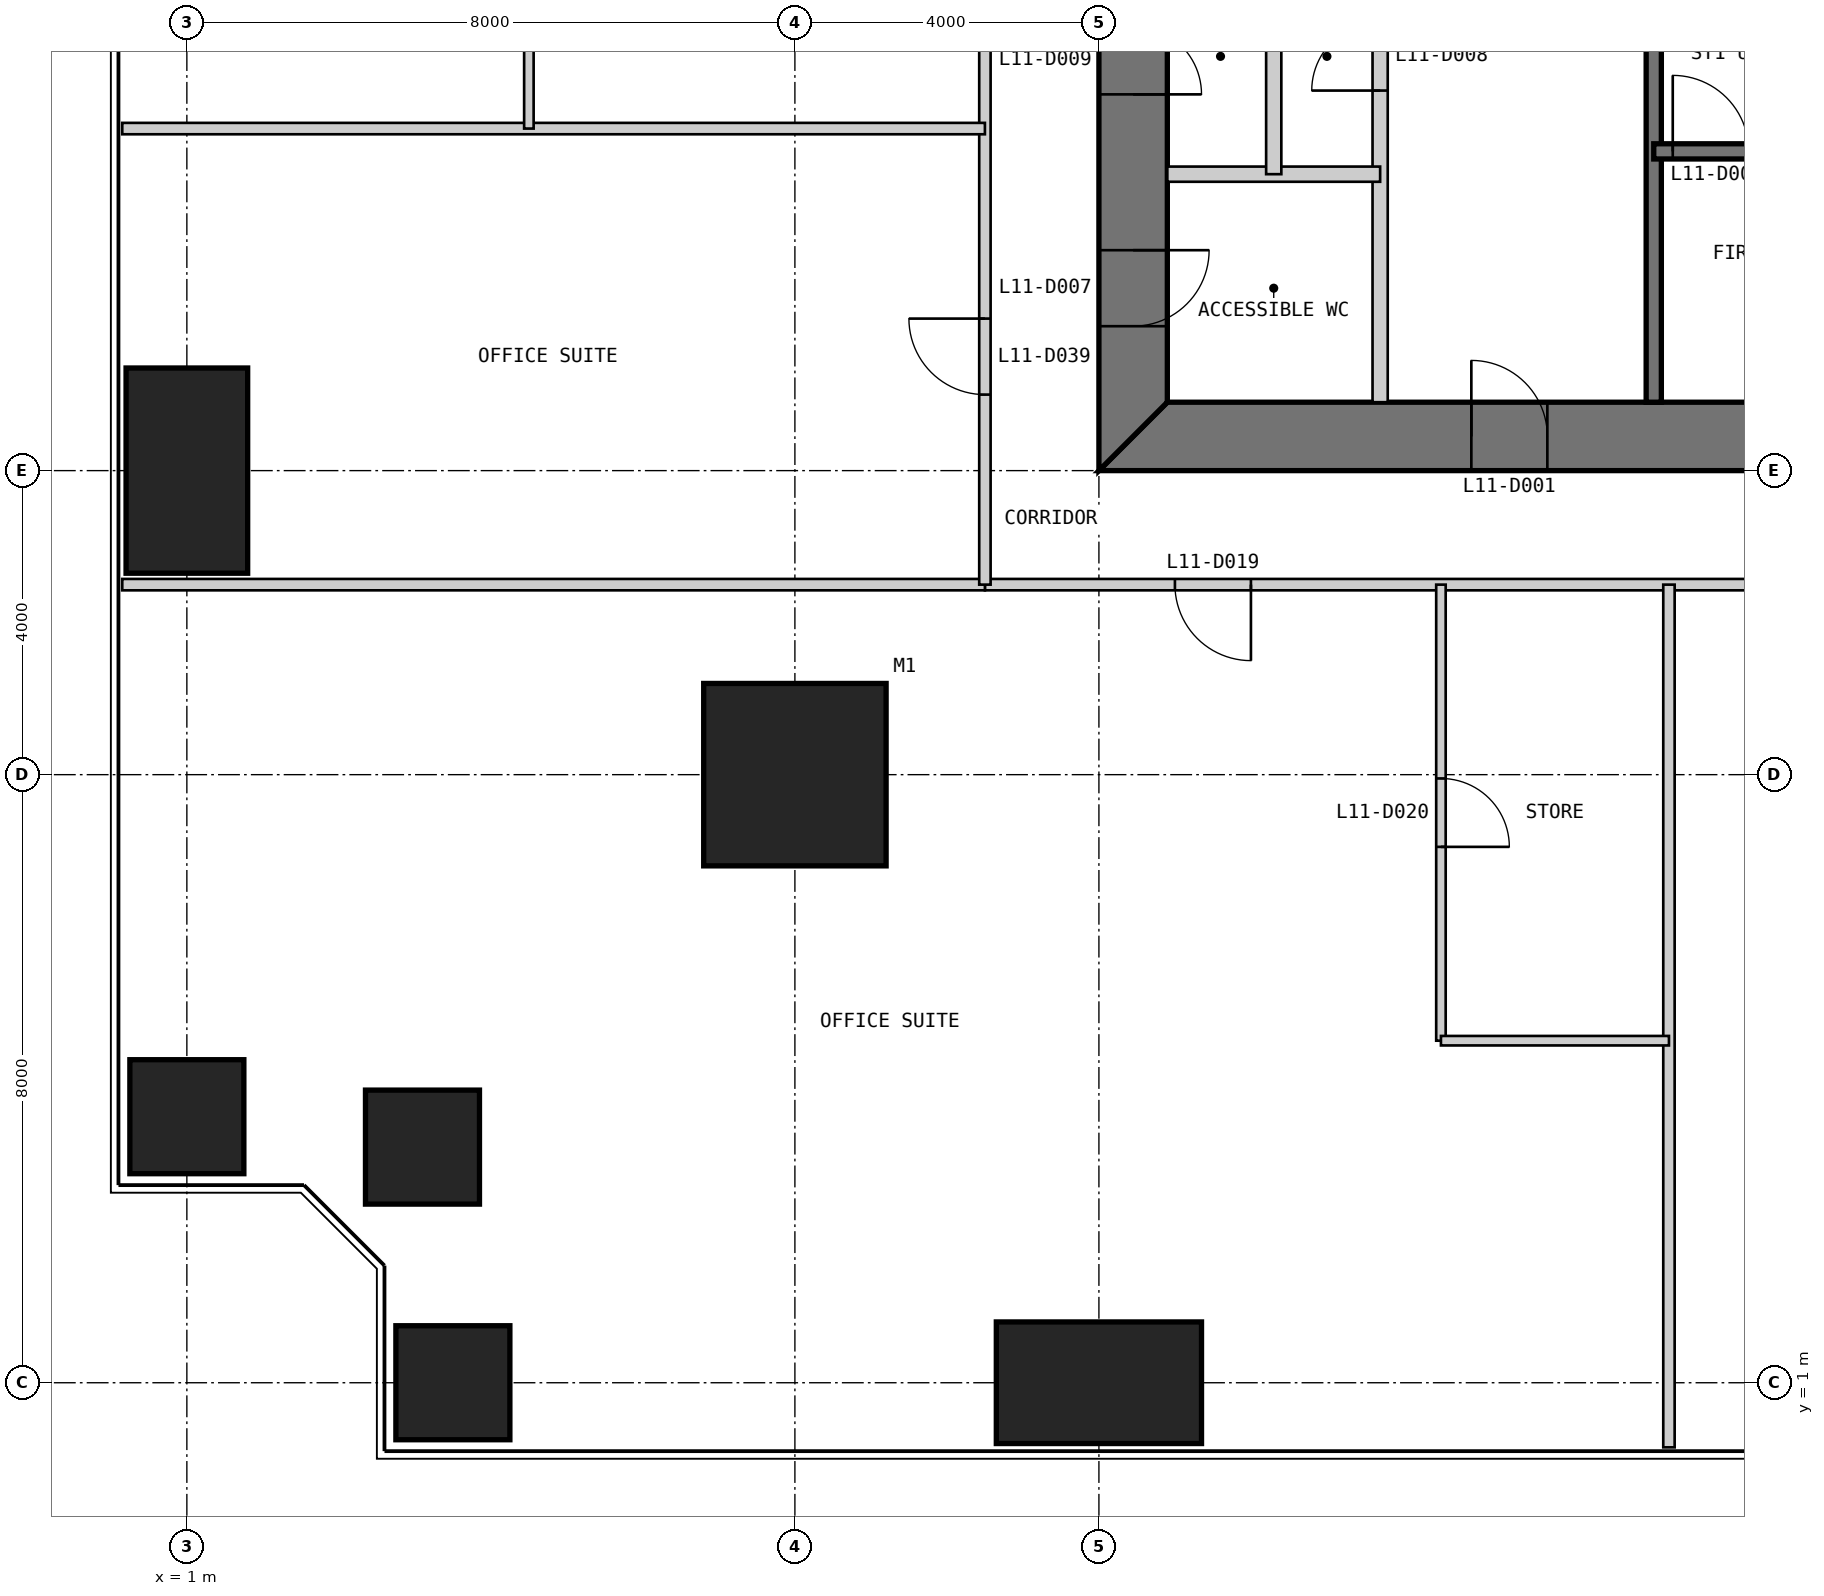
"""IFC4 building model, lengths in metres.
Left out: names, types, materials, properties, quantities, classifications, styles, units other than length and angle.
Written with IfcOpenShell. Run it as: python <this file> out.ifc"""

import sys

from ifc_helpers import new_model, si_unit, direction, frame, frame_2d, origin, origin_2d, place, context, subcontext, project, spatial, polyline, rectangle, outline, extrude, element, fill, save


model = new_model("IFC4")
c1 = context("Model", 3, precision=1e-05, world=origin(), true_north=direction((0.0, 1.0)))
c2 = subcontext(c1, "Body", "Model", "MODEL_VIEW")
j1 = project(units=[si_unit("LENGTHUNIT", "METRE"), si_unit("PLANEANGLEUNIT", "RADIAN")], contexts=[c1])
p1 = place(None, origin())
s1 = spatial("IfcSite", under=j1, at=p1, CompositionType="ELEMENT")
p2 = place(p1, origin())
s2 = spatial("IfcBuilding", under=s1, at=p2, CompositionType="ELEMENT")
p3 = place(p2, frame((0.0, 0.0, 51.0)))
s3 = spatial("IfcBuildingStorey", under=s2, at=p3, CompositionType="ELEMENT", Elevation=51.0)
p4 = place(p3, frame((9.0, 9.0, 0.0), z_axis=(0.0, 0.0, 1.0), x_axis=(1.0, 0.0, 0.0)))
e1 = element("IfcColumn", 1, at=p4, inside=s3, PredefinedType="COLUMN", context=c2, shape_type="SweptSolid", body=[
    extrude(rectangle(XDim=2.4, YDim=2.4, at=origin_2d()), origin(), (0.0, 0.0, 1.0), 4.0),
])
p5 = place(p3, frame((4.5, 1.0, 0.0), z_axis=(0.0, 0.0, 1.0), x_axis=(1.0, 0.0, 0.0)))
e2 = element("IfcColumn", 2, at=p5, inside=s3, PredefinedType="COLUMN", context=c2, shape_type="SweptSolid", body=[
    extrude(rectangle(XDim=1.5, YDim=1.5, at=origin_2d()), origin(), (0.0, 0.0, 1.0), 4.0),
])
p6 = place(p3, frame((13.0, 1.0, 0.0), z_axis=(0.0, 0.0, 1.0), x_axis=(1.0, 0.0, 0.0)))
e3 = element("IfcColumn", 3, at=p6, inside=s3, PredefinedType="COLUMN", context=c2, shape_type="SweptSolid", body=[
    extrude(rectangle(XDim=2.7, YDim=1.6, at=origin_2d()), origin(), (0.0, 0.0, 1.0), 4.0),
])
p7 = place(p3, frame((1.0, 13.0, 0.0), z_axis=(0.0, 0.0, 1.0), x_axis=(1.0, 0.0, 0.0)))
e4 = element("IfcColumn", 4, at=p7, inside=s3, PredefinedType="COLUMN", context=c2, shape_type="SweptSolid", body=[
    extrude(rectangle(XDim=1.6, YDim=2.7, at=origin_2d()), origin(), (0.0, 0.0, 1.0), 4.0),
])
for number, where, z_axis, x_axis in (
    (5, (1.0, 4.5, 0.0), (0.0, 0.0, 1.0), (1.0, 0.0, 0.0)),
    (6, (4.1, 4.1, 0.0), (0.0, 0.0, 1.0), (1.0, 0.0, 0.0)),
):
    element("IfcColumn", number, at=place(p3, frame(where, z_axis=z_axis, x_axis=x_axis)), inside=s3, PredefinedType="COLUMN", context=c2, shape_type="SweptSolid", body=[
        extrude(rectangle(XDim=1.5, YDim=1.5, at=origin_2d()), origin(), (0.0, 0.0, 1.0), 4.0),
    ])
p8 = place(p3, frame((13.0, 13.45, 0.0), z_axis=(0.0, 0.0, 1.0), x_axis=(1.0, 0.0, 0.0)))
e7 = element("IfcWall", 7, at=p8, inside=s3, PredefinedType="SHEAR", context=c2, shape_type="SweptSolid", body=[
    extrude(outline(polyline([(0.0, -0.45), (24.0, -0.45), (23.1, 0.45), (0.9, 0.45), (0.0, -0.45)])), origin(), (0.0, 0.0, 1.0), 4.0),
])
p9 = place(p8, frame((4.9, 0.0, 0.0)))
e8 = element("IfcOpeningElement", 8, at=p9, cuts=e7, PredefinedType="OPENING", context=c2, shape_type="SweptSolid", body=[
    extrude(rectangle(XDim=1.0, YDim=2.2, at=frame_2d((0.5, 1.1))), frame((0.0, 0.46, 0.0), z_axis=(0.0, -1.0, 0.0), x_axis=(1.0, 0.0, 0.0)), (0.0, 0.0, 1.0), 0.92),
])
p10 = place(p8, frame((8.9, 0.0, 0.0)))
e9 = element("IfcOpeningElement", 9, at=p10, cuts=e7, PredefinedType="OPENING", context=c2, shape_type="SweptSolid", body=[
    extrude(rectangle(XDim=1.1, YDim=2.2, at=frame_2d((0.55, 1.1))), frame((0.0, 0.46, 0.0), z_axis=(0.0, -1.0, 0.0), x_axis=(1.0, 0.0, 0.0)), (0.0, 0.0, 1.0), 0.92),
])
p11 = place(p8, frame((15.05, 0.0, 0.0)))
e10 = element("IfcOpeningElement", 10, at=p11, cuts=e7, PredefinedType="OPENING", context=c2, shape_type="SweptSolid", body=[
    extrude(rectangle(XDim=0.9, YDim=2.2, at=frame_2d((0.45, 1.1))), frame((0.0, 0.46, 0.0), z_axis=(0.0, -1.0, 0.0), x_axis=(1.0, 0.0, 0.0)), (0.0, 0.0, 1.0), 0.92),
])
p12 = place(p8, frame((17.9, 0.0, 0.0)))
e11 = element("IfcOpeningElement", 11, at=p12, cuts=e7, PredefinedType="OPENING", context=c2, shape_type="SweptSolid", body=[
    extrude(rectangle(XDim=1.0, YDim=2.2, at=frame_2d((0.5, 1.1))), frame((0.0, 0.46, 0.0), z_axis=(0.0, -1.0, 0.0), x_axis=(1.0, 0.0, 0.0)), (0.0, 0.0, 1.0), 0.92),
])
p13 = place(p8, frame((21.4, 0.0, 0.0)))
e12 = element("IfcOpeningElement", 12, at=p13, cuts=e7, PredefinedType="OPENING", context=c2, shape_type="SweptSolid", body=[
    extrude(rectangle(XDim=1.0, YDim=2.2, at=frame_2d((0.5, 1.1))), frame((0.0, 0.46, 0.0), z_axis=(0.0, -1.0, 0.0), x_axis=(1.0, 0.0, 0.0)), (0.0, 0.0, 1.0), 0.92),
])
p14 = place(p3, frame((13.45, 36.1, 0.0), z_axis=(0.0, 0.0, 1.0), x_axis=(0.0, -1.0, 0.0)))
e13 = element("IfcWall", 13, at=p14, inside=s3, PredefinedType="SHEAR", context=c2, shape_type="SweptSolid", body=[
    extrude(outline(polyline([(-0.9, -0.45), (23.1, -0.45), (22.2, 0.45), (0.0, 0.45), (-0.9, -0.45)])), origin(), (0.0, 0.0, 1.0), 4.0),
])
p15 = place(p14, frame((20.2, 0.0, 0.0)))
e14 = element("IfcOpeningElement", 14, at=p15, cuts=e13, PredefinedType="OPENING", context=c2, shape_type="SweptSolid", body=[
    extrude(rectangle(XDim=1.0, YDim=2.2, at=frame_2d((0.5, 1.1))), frame((0.0, 0.46, 0.0), z_axis=(0.0, -1.0, 0.0), x_axis=(1.0, 0.0, 0.0)), (0.0, 0.0, 1.0), 0.92),
])
p16 = place(p14, frame((17.25, 0.0, 0.0)))
e15 = element("IfcOpeningElement", 15, at=p16, cuts=e13, PredefinedType="OPENING", context=c2, shape_type="SweptSolid", body=[
    extrude(rectangle(XDim=0.9, YDim=2.2, at=frame_2d((0.45, 1.1))), frame((0.0, 0.46, 0.0), z_axis=(0.0, -1.0, 0.0), x_axis=(1.0, 0.0, 0.0)), (0.0, 0.0, 1.0), 0.92),
])
p17 = place(p3, frame((16.7, 13.9, 0.0), z_axis=(0.0, 0.0, 1.0), x_axis=(0.0, 1.0, 0.0)))
e16 = element("IfcWall", 16, at=p17, inside=s3, PredefinedType="PARTITIONING", context=c2, shape_type="SweptSolid", body=[
    extrude(rectangle(XDim=16.1, YDim=0.2, at=frame_2d((8.05, 0.0))), origin(), (0.0, 0.0, 1.0), 3.8),
])
p18 = place(p17, frame((4.1, 0.0, 0.0)))
e17 = element("IfcOpeningElement", 17, at=p18, cuts=e16, PredefinedType="OPENING", context=c2, shape_type="SweptSolid", body=[
    extrude(rectangle(XDim=0.9, YDim=2.2, at=frame_2d((0.45, 1.1))), frame((0.0, 0.11, 0.0), z_axis=(0.0, -1.0, 0.0), x_axis=(1.0, 0.0, 0.0)), (0.0, 0.0, 1.0), 0.22),
])
p19 = place(p17, frame((7.217, 0.0, 0.0)))
e18 = element("IfcOpeningElement", 18, at=p19, cuts=e16, PredefinedType="OPENING", context=c2, shape_type="SweptSolid", body=[
    extrude(rectangle(XDim=1.1, YDim=2.2, at=frame_2d((0.55, 1.1))), frame((0.0, 0.11, 0.0), z_axis=(0.0, -1.0, 0.0), x_axis=(1.0, 0.0, 0.0)), (0.0, 0.0, 1.0), 0.22),
])
p20 = place(p17, frame((10.55, 0.0, 0.0)))
e19 = element("IfcOpeningElement", 19, at=p20, cuts=e16, PredefinedType="OPENING", context=c2, shape_type="SweptSolid", body=[
    extrude(rectangle(XDim=1.1, YDim=2.2, at=frame_2d((0.55, 1.1))), frame((0.0, 0.11, 0.0), z_axis=(0.0, -1.0, 0.0), x_axis=(1.0, 0.0, 0.0)), (0.0, 0.0, 1.0), 0.22),
])
p21 = place(p17, frame((13.883, 0.0, 0.0)))
e20 = element("IfcOpeningElement", 20, at=p21, cuts=e16, PredefinedType="OPENING", context=c2, shape_type="SweptSolid", body=[
    extrude(rectangle(XDim=1.1, YDim=2.2, at=frame_2d((0.55, 1.1))), frame((0.0, 0.11, 0.0), z_axis=(0.0, -1.0, 0.0), x_axis=(1.0, 0.0, 0.0)), (0.0, 0.0, 1.0), 0.22),
])
p22 = place(p3, frame((20.3, 13.9, 0.0), z_axis=(0.0, 0.0, 1.0), x_axis=(0.0, 1.0, 0.0)))
e21 = element("IfcWall", 21, at=p22, inside=s3, PredefinedType="SOLIDWALL", context=c2, shape_type="SweptSolid", body=[
    extrude(rectangle(XDim=16.1, YDim=0.2, at=frame_2d((8.05, 0.0))), origin(), (0.0, 0.0, 1.0), 3.8),
])
p23 = place(p3, frame((20.3, 17.2, 0.0), z_axis=(0.0, 0.0, 1.0), x_axis=(1.0, 0.0, 0.0)))
e22 = element("IfcWall", 22, at=p23, inside=s3, PredefinedType="SOLIDWALL", context=c2, shape_type="SweptSolid", body=[
    extrude(rectangle(XDim=9.4, YDim=0.2, at=frame_2d((4.7, 0.0))), origin(), (0.0, 0.0, 1.0), 3.8),
])
p24 = place(p23, frame((0.25, 0.0, 0.0)))
e23 = element("IfcOpeningElement", 23, at=p24, cuts=e22, PredefinedType="OPENING", context=c2, shape_type="SweptSolid", body=[
    extrude(rectangle(XDim=1.0, YDim=2.2, at=frame_2d((0.5, 1.1))), frame((0.0, 0.11, 0.0), z_axis=(0.0, -1.0, 0.0), x_axis=(1.0, 0.0, 0.0)), (0.0, 0.0, 1.0), 0.22),
])
p25 = place(p3, frame((13.9, 16.9, 0.0), z_axis=(0.0, 0.0, 1.0), x_axis=(1.0, 0.0, 0.0)))
e24 = element("IfcWall", 24, at=p25, inside=s3, PredefinedType="PARTITIONING", context=c2, shape_type="SweptSolid", body=[
    extrude(rectangle(XDim=2.8, YDim=0.2, at=frame_2d((1.4, 0.0))), origin(), (0.0, 0.0, 1.0), 3.8),
])
p26 = place(p3, frame((15.3, 16.9, 0.0), z_axis=(0.0, 0.0, 1.0), x_axis=(0.0, 1.0, 0.0)))
e25 = element("IfcWall", 25, at=p26, inside=s3, PredefinedType="PARTITIONING", context=c2, shape_type="SweptSolid", body=[
    extrude(rectangle(XDim=3.1, YDim=0.2, at=frame_2d((1.55, 0.0))), origin(), (0.0, 0.0, 1.0), 3.8),
])
p27 = place(p3, frame((11.5, 11.5, 0.0), z_axis=(0.0, 0.0, 1.0), x_axis=(1.0, 0.0, 0.0)))
e26 = element("IfcWall", 26, at=p27, inside=s3, PredefinedType="PARTITIONING", context=c2, shape_type="SweptSolid", body=[
    extrude(rectangle(XDim=27.0, YDim=0.15, at=frame_2d((13.5, 0.0))), origin(), (0.0, 0.0, 1.0), 3.85),
])
p28 = place(p27, frame((2.5, 0.0, 0.0)))
e27 = element("IfcOpeningElement", 27, at=p28, cuts=e26, PredefinedType="OPENING", context=c2, shape_type="SweptSolid", body=[
    extrude(rectangle(XDim=1.0, YDim=2.2, at=frame_2d((0.5, 1.1))), frame((0.0, 0.085, 0.0), z_axis=(0.0, -1.0, 0.0), x_axis=(1.0, 0.0, 0.0)), (0.0, 0.0, 1.0), 0.17),
])
p29 = place(p27, frame((16.0, 0.0, 0.0)))
e28 = element("IfcOpeningElement", 28, at=p29, cuts=e26, PredefinedType="OPENING", context=c2, shape_type="SweptSolid", body=[
    extrude(rectangle(XDim=1.0, YDim=2.2, at=frame_2d((0.5, 1.1))), frame((0.0, 0.085, 0.0), z_axis=(0.0, -1.0, 0.0), x_axis=(1.0, 0.0, 0.0)), (0.0, 0.0, 1.0), 0.17),
])
p30 = place(p3, frame((0.15, 11.5, 0.0), z_axis=(0.0, 0.0, 1.0), x_axis=(1.0, 0.0, 0.0)))
e29 = element("IfcWall", 29, at=p30, inside=s3, PredefinedType="PARTITIONING", context=c2, shape_type="SweptSolid", body=[
    extrude(rectangle(XDim=11.35, YDim=0.15, at=frame_2d((5.675, 0.0))), origin(), (0.0, 0.0, 1.0), 3.85),
])
p31 = place(p3, frame((17.5, 5.5, 0.0), z_axis=(0.0, 0.0, 1.0), x_axis=(0.0, 1.0, 0.0)))
e30 = element("IfcWall", 30, at=p31, inside=s3, PredefinedType="PARTITIONING", context=c2, shape_type="SweptSolid", body=[
    extrude(rectangle(XDim=6.0, YDim=0.125, at=frame_2d((3.0, 0.0))), origin(), (0.0, 0.0, 1.0), 3.85),
])
p32 = place(p31, frame((2.55, 0.0, 0.0)))
e31 = element("IfcOpeningElement", 31, at=p32, cuts=e30, PredefinedType="OPENING", context=c2, shape_type="SweptSolid", body=[
    extrude(rectangle(XDim=0.9, YDim=2.2, at=frame_2d((0.45, 1.1))), frame((0.0, 0.073, 0.0), z_axis=(0.0, -1.0, 0.0), x_axis=(1.0, 0.0, 0.0)), (0.0, 0.0, 1.0), 0.145),
])
p33 = place(p3, frame((20.5, 0.15, 0.0), z_axis=(0.0, 0.0, 1.0), x_axis=(0.0, 1.0, 0.0)))
e32 = element("IfcWall", 32, at=p33, inside=s3, PredefinedType="PARTITIONING", context=c2, shape_type="SweptSolid", body=[
    extrude(rectangle(XDim=11.35, YDim=0.15, at=frame_2d((5.675, 0.0))), origin(), (0.0, 0.0, 1.0), 3.85),
])
p34 = place(p3, frame((17.5, 5.5, 0.0), z_axis=(0.0, 0.0, 1.0), x_axis=(1.0, 0.0, 0.0)))
e33 = element("IfcWall", 33, at=p34, inside=s3, PredefinedType="PARTITIONING", context=c2, shape_type="SweptSolid", body=[
    extrude(rectangle(XDim=3.0, YDim=0.125, at=frame_2d((1.5, 0.0))), origin(), (0.0, 0.0, 1.0), 3.85),
])
p35 = place(p3, frame((11.5, 38.5, 0.0), z_axis=(0.0, 0.0, 1.0), x_axis=(0.0, -1.0, 0.0)))
e34 = element("IfcWall", 34, at=p35, inside=s3, PredefinedType="PARTITIONING", context=c2, shape_type="SweptSolid", body=[
    extrude(rectangle(XDim=27.0, YDim=0.15, at=frame_2d((13.5, 0.0))), origin(), (0.0, 0.0, 1.0), 3.85),
])
p36 = place(p35, frame((2.5, 0.0, 0.0)))
e35 = element("IfcOpeningElement", 35, at=p36, cuts=e34, PredefinedType="OPENING", context=c2, shape_type="SweptSolid", body=[
    extrude(rectangle(XDim=1.0, YDim=2.2, at=frame_2d((0.5, 1.1))), frame((0.0, 0.085, 0.0), z_axis=(0.0, -1.0, 0.0), x_axis=(1.0, 0.0, 0.0)), (0.0, 0.0, 1.0), 0.17),
])
p37 = place(p35, frame((13.0, 0.0, 0.0)))
e36 = element("IfcOpeningElement", 36, at=p37, cuts=e34, PredefinedType="OPENING", context=c2, shape_type="SweptSolid", body=[
    extrude(rectangle(XDim=1.0, YDim=2.2, at=frame_2d((0.5, 1.1))), frame((0.0, 0.085, 0.0), z_axis=(0.0, -1.0, 0.0), x_axis=(1.0, 0.0, 0.0)), (0.0, 0.0, 1.0), 0.17),
])
p38 = place(p35, frame((23.5, 0.0, 0.0)))
e37 = element("IfcOpeningElement", 37, at=p38, cuts=e34, PredefinedType="OPENING", context=c2, shape_type="SweptSolid", body=[
    extrude(rectangle(XDim=1.0, YDim=2.2, at=frame_2d((0.5, 1.1))), frame((0.0, 0.085, 0.0), z_axis=(0.0, -1.0, 0.0), x_axis=(1.0, 0.0, 0.0)), (0.0, 0.0, 1.0), 0.17),
])
p39 = place(p3, frame((0.15, 17.5, 0.0), z_axis=(0.0, 0.0, 1.0), x_axis=(1.0, 0.0, 0.0)))
e38 = element("IfcWall", 38, at=p39, inside=s3, PredefinedType="PARTITIONING", context=c2, shape_type="SweptSolid", body=[
    extrude(rectangle(XDim=11.35, YDim=0.15, at=frame_2d((5.675, 0.0))), origin(), (0.0, 0.0, 1.0), 3.85),
])
p40 = place(p3, frame((5.5, 20.5, 0.0), z_axis=(0.0, 0.0, 1.0), x_axis=(0.0, -1.0, 0.0)))
e39 = element("IfcWall", 39, at=p40, inside=s3, PredefinedType="PARTITIONING", context=c2, shape_type="SweptSolid", body=[
    extrude(rectangle(XDim=3.0, YDim=0.125, at=frame_2d((1.5, 0.0))), origin(), (0.0, 0.0, 1.0), 3.85),
])
p41 = place(p9, origin())
e40 = element("IfcDoor", 40, at=p41, inside=s3, OperationType="SINGLE_SWING_LEFT", PredefinedType="DOOR", context=c2, shape_type="SweptSolid", body=[
    extrude(rectangle(XDim=1.0, YDim=2.2, at=frame_2d((0.5, 1.1))), frame((0.0, 0.025, 0.0), z_axis=(0.0, -1.0, 0.0), x_axis=(1.0, 0.0, 0.0)), (0.0, 0.0, 1.0), 0.05),
    extrude(outline(polyline([(0.0, 0.0), (0.04, 0.0), (0.04, 2.16), (0.96, 2.16), (0.96, 0.0), (1.0, 0.0), (1.0, 2.2), (0.0, 2.2), (0.0, 0.0)])), frame((0.0, 0.3, 0.0), z_axis=(0.0, -1.0, 0.0), x_axis=(1.0, 0.0, 0.0)), (0.0, 0.0, 1.0), 0.6),
])
fill(e8, e40)
p42 = place(p24, origin())
e41 = element("IfcDoor", 41, at=p42, inside=s3, OperationType="SINGLE_SWING_LEFT", PredefinedType="DOOR", context=c2, shape_type="SweptSolid", body=[
    extrude(rectangle(XDim=1.0, YDim=2.2, at=frame_2d((0.5, 1.1))), frame((0.0, 0.025, 0.0), z_axis=(0.0, -1.0, 0.0), x_axis=(1.0, 0.0, 0.0)), (0.0, 0.0, 1.0), 0.05),
])
fill(e23, e41)
p43 = place(p15, origin())
e42 = element("IfcDoor", 42, at=p43, inside=s3, OperationType="SINGLE_SWING_LEFT", PredefinedType="DOOR", context=c2, shape_type="SweptSolid", body=[
    extrude(rectangle(XDim=1.0, YDim=2.2, at=frame_2d((0.5, 1.1))), frame((0.0, 0.025, 0.0), z_axis=(0.0, -1.0, 0.0), x_axis=(1.0, 0.0, 0.0)), (0.0, 0.0, 1.0), 0.05),
    extrude(outline(polyline([(0.0, 0.0), (0.04, 0.0), (0.04, 2.16), (0.96, 2.16), (0.96, 0.0), (1.0, 0.0), (1.0, 2.2), (0.0, 2.2), (0.0, 0.0)])), frame((0.0, 0.3, 0.0), z_axis=(0.0, -1.0, 0.0), x_axis=(1.0, 0.0, 0.0)), (0.0, 0.0, 1.0), 0.6),
])
fill(e14, e42)
p44 = place(p18, origin())
e43 = element("IfcDoor", 43, at=p44, inside=s3, OperationType="SINGLE_SWING_LEFT", PredefinedType="DOOR", context=c2, shape_type="SweptSolid", body=[
    extrude(rectangle(XDim=0.9, YDim=2.2, at=frame_2d((0.45, 1.1))), frame((0.0, 0.025, 0.0), z_axis=(0.0, -1.0, 0.0), x_axis=(1.0, 0.0, 0.0)), (0.0, 0.0, 1.0), 0.05),
])
fill(e17, e43)
p45 = place(p16, origin())
e44 = element("IfcDoor", 44, at=p45, inside=s3, OperationType="SINGLE_SWING_RIGHT", PredefinedType="DOOR", context=c2, shape_type="SweptSolid", body=[
    extrude(rectangle(XDim=0.9, YDim=2.2, at=frame_2d((0.45, 1.1))), frame((0.0, 0.025, 0.0), z_axis=(0.0, -1.0, 0.0), x_axis=(1.0, 0.0, 0.0)), (0.0, 0.0, 1.0), 0.05),
    extrude(outline(polyline([(0.0, 0.0), (0.04, 0.0), (0.04, 2.16), (0.86, 2.16), (0.86, 0.0), (0.9, 0.0), (0.9, 2.2), (0.0, 2.2), (0.0, 0.0)])), frame((0.0, 0.3, 0.0), z_axis=(0.0, -1.0, 0.0), x_axis=(1.0, 0.0, 0.0)), (0.0, 0.0, 1.0), 0.6),
])
fill(e15, e44)
p46 = place(p28, frame((1.0, 0.0, 0.0), z_axis=(0.0, 0.0, 1.0), x_axis=(-1.0, 0.0, 0.0)))
e45 = element("IfcDoor", 45, at=p46, inside=s3, OperationType="SINGLE_SWING_LEFT", PredefinedType="DOOR", context=c2, shape_type="SweptSolid", body=[
    extrude(rectangle(XDim=1.0, YDim=2.2, at=frame_2d((0.5, 1.1))), frame((0.0, 0.025, 0.0), z_axis=(0.0, -1.0, 0.0), x_axis=(1.0, 0.0, 0.0)), (0.0, 0.0, 1.0), 0.05),
])
fill(e27, e45)
p47 = place(p32, frame((0.9, 0.0, 0.0), z_axis=(0.0, 0.0, 1.0), x_axis=(-1.0, 0.0, 0.0)))
e46 = element("IfcDoor", 46, at=p47, inside=s3, OperationType="SINGLE_SWING_RIGHT", PredefinedType="DOOR", context=c2, shape_type="SweptSolid", body=[
    extrude(rectangle(XDim=0.9, YDim=2.2, at=frame_2d((0.45, 1.1))), frame((0.0, 0.025, 0.0), z_axis=(0.0, -1.0, 0.0), x_axis=(1.0, 0.0, 0.0)), (0.0, 0.0, 1.0), 0.05),
])
fill(e31, e46)
p48 = place(p38, frame((1.0, 0.0, 0.0), z_axis=(0.0, 0.0, 1.0), x_axis=(-1.0, 0.0, 0.0)))
e47 = element("IfcDoor", 47, at=p48, inside=s3, OperationType="SINGLE_SWING_RIGHT", PredefinedType="DOOR", context=c2, shape_type="SweptSolid", body=[
    extrude(rectangle(XDim=1.0, YDim=2.2, at=frame_2d((0.5, 1.1))), frame((0.0, 0.025, 0.0), z_axis=(0.0, -1.0, 0.0), x_axis=(1.0, 0.0, 0.0)), (0.0, 0.0, 1.0), 0.05),
])
fill(e37, e47)
save(model, sys.argv[1])
